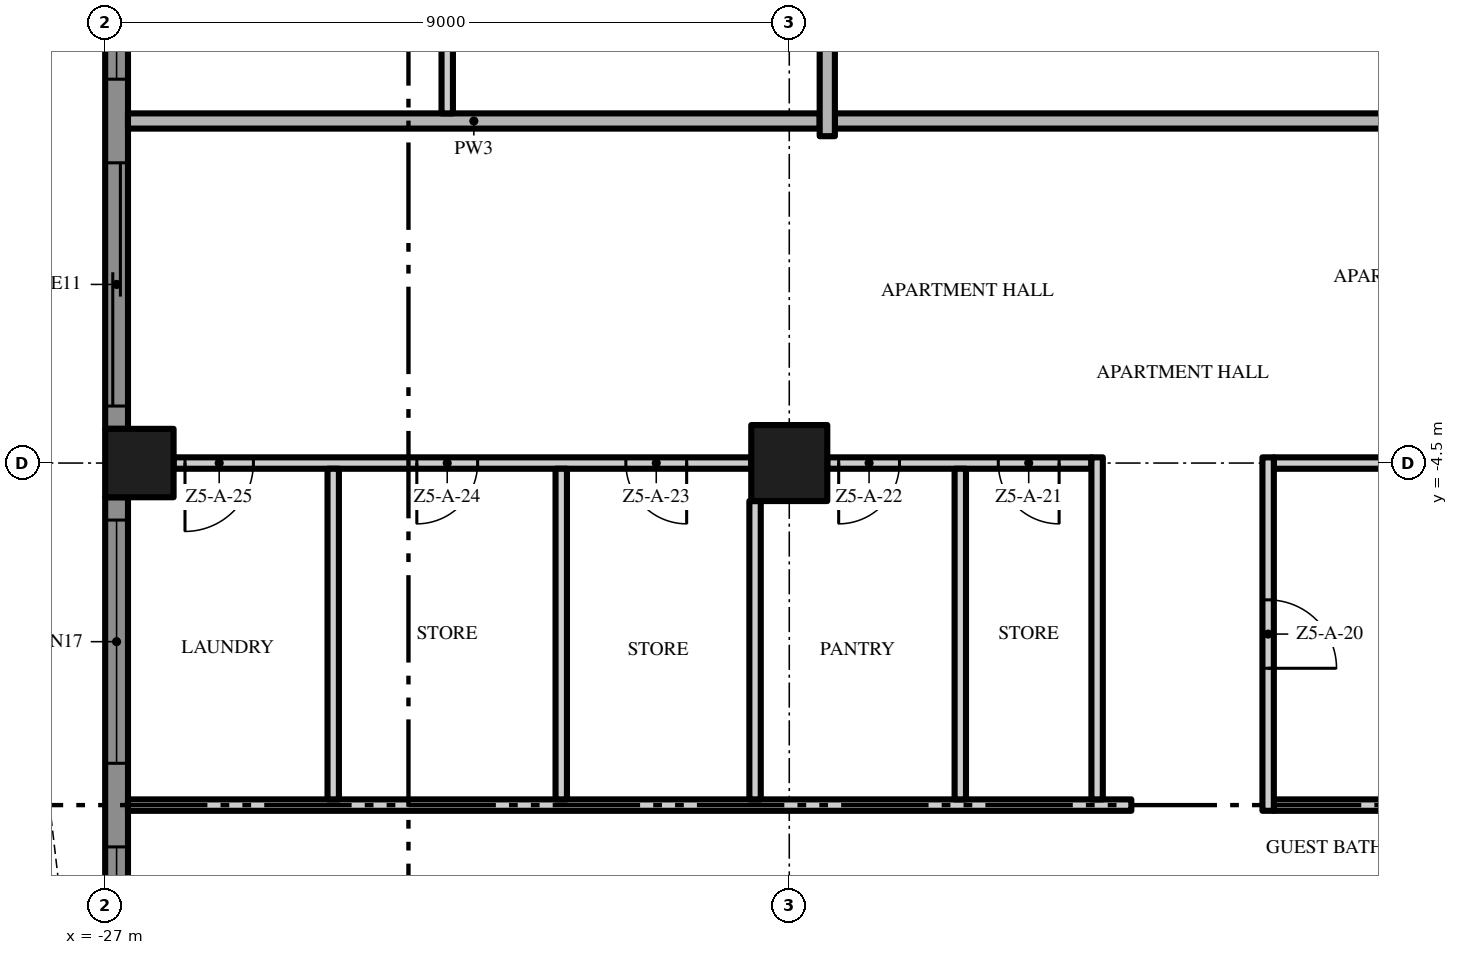
"""IFC4 building model, lengths in metres.
Left out: names, types, materials, properties, quantities, classifications, styles, units other than length and angle.
Written with IfcOpenShell. Run it as: python <this file> out.ifc"""

import sys

from ifc_helpers import new_model, si_unit, direction, frame, frame_2d, origin, origin_2d, place, context, subcontext, project, spatial, polyline, rectangle, outline, extrude, element, fill, save


model = new_model("IFC4")
c1 = context("Model", 3, precision=1e-05, world=origin(), true_north=direction((0.0, 1.0)))
c2 = subcontext(c1, "Body", "Model", "MODEL_VIEW")
j1 = project(units=[si_unit("LENGTHUNIT", "METRE"), si_unit("PLANEANGLEUNIT", "RADIAN")], contexts=[c1])
p1 = place(None, origin())
s1 = spatial("IfcSite", under=j1, at=p1, CompositionType="ELEMENT")
p2 = place(p1, origin())
s2 = spatial("IfcBuilding", under=s1, at=p2, CompositionType="ELEMENT")
p3 = place(p2, frame((0.0, 0.0, 238.8)))
s3 = spatial("IfcBuildingStorey", under=s2, at=p3, CompositionType="ELEMENT", Elevation=238.8)
p4 = place(p3, frame((-18.0, -4.5, 0.0), z_axis=(0.0, 0.0, 1.0), x_axis=(1.0, 0.0, 0.0)))
e1 = element("IfcColumn", 1, at=p4, inside=s3, PredefinedType="COLUMN", context=c2, shape_type="SweptSolid", body=[
    extrude(rectangle(XDim=1.0, YDim=1.0, at=origin_2d()), origin(), (0.0, 0.0, 1.0), 3.5),
])
p5 = place(p3, frame((-26.55, -4.5, 0.0), z_axis=(0.0, 0.0, 1.0), x_axis=(1.0, 0.0, 0.0)))
e2 = element("IfcColumn", 2, at=p5, inside=s3, PredefinedType="COLUMN", context=c2, shape_type="SweptSolid", body=[
    extrude(rectangle(XDim=0.9, YDim=0.9, at=origin_2d()), origin(), (0.0, 0.0, 1.0), 3.5),
])
p6 = place(p3, frame((-26.85, -4.05, 0.0), z_axis=(0.0, 0.0, 1.0), x_axis=(0.0, 1.0, 0.0)))
e3 = element("IfcWall", 3, at=p6, inside=s3, PredefinedType="SOLIDWALL", context=c2, shape_type="SweptSolid", body=[
    extrude(rectangle(XDim=8.1, YDim=0.3, at=frame_2d((4.05, 0.0))), origin(), (0.0, 0.0, 1.0), 3.5),
])
p7 = place(p6, frame((4.6, 0.0, 0.45)))
e4 = element("IfcOpeningElement", 4, at=p7, cuts=e3, PredefinedType="OPENING", context=c2, shape_type="SweptSolid", body=[
    extrude(rectangle(XDim=3.2, YDim=2.65, at=frame_2d((1.6, 1.325))), frame((0.0, 0.16, 0.0), z_axis=(0.0, -1.0, 0.0), x_axis=(1.0, 0.0, 0.0)), (0.0, 0.0, 1.0), 0.32),
])
p8 = place(p6, frame((0.3, 0.0, 0.0)))
e5 = element("IfcOpeningElement", 5, at=p8, cuts=e3, PredefinedType="OPENING", context=c2, shape_type="SweptSolid", body=[
    extrude(rectangle(XDim=3.2, YDim=2.4, at=frame_2d((1.6, 1.2))), frame((0.0, 0.16, 0.0), z_axis=(0.0, -1.0, 0.0), x_axis=(1.0, 0.0, 0.0)), (0.0, 0.0, 1.0), 0.32),
])
p9 = place(p3, frame((-26.85, -13.05, 0.0), z_axis=(0.0, 0.0, 1.0), x_axis=(0.0, 1.0, 0.0)))
e6 = element("IfcWall", 6, at=p9, inside=s3, PredefinedType="SOLIDWALL", context=c2, shape_type="SweptSolid", body=[
    extrude(rectangle(XDim=8.1, YDim=0.3, at=frame_2d((4.05, 0.0))), origin(), (0.0, 0.0, 1.0), 3.5),
])
p10 = place(p9, frame((4.6, 0.0, 0.45)))
e7 = element("IfcOpeningElement", 7, at=p10, cuts=e6, PredefinedType="OPENING", context=c2, shape_type="SweptSolid", body=[
    extrude(rectangle(XDim=3.2, YDim=2.65, at=frame_2d((1.6, 1.325))), frame((0.0, 0.16, 0.0), z_axis=(0.0, -1.0, 0.0), x_axis=(1.0, 0.0, 0.0)), (0.0, 0.0, 1.0), 0.32),
])
p11 = place(p9, frame((0.3, 0.0, 0.45)))
e8 = element("IfcOpeningElement", 8, at=p11, cuts=e6, PredefinedType="OPENING", context=c2, shape_type="SweptSolid", body=[
    extrude(rectangle(XDim=3.2, YDim=2.65, at=frame_2d((1.6, 1.325))), frame((0.0, 0.16, 0.0), z_axis=(0.0, -1.0, 0.0), x_axis=(1.0, 0.0, 0.0)), (0.0, 0.0, 1.0), 0.32),
])
p12 = place(p3, origin())
e9 = element("IfcWall", 9, at=p12, inside=s3, PredefinedType="USERDEFINED", context=c2, shape_type="SweptSolid", body=[
    extrude(outline(polyline([(-27.951, 18.0), (-28.612, 16.5), (-29.345, 15.0), (-29.869, 13.5), (-30.0, 12.375), (-29.985, 12.0), (-29.649, 10.5), (-28.988, 9.0), (-28.255, 7.5), (-27.731, 6.0), (-27.6, 4.875), (-27.615, 4.5), (-27.951, 3.0), (-28.612, 1.5), (-29.345, 0.0), (-29.869, -1.5), (-30.0, -2.625), (-29.985, -3.0), (-29.649, -4.5), (-28.988, -6.0), (-28.255, -7.5), (-27.731, -9.0), (-27.6, -10.125), (-27.615, -10.5), (-27.951, -12.0), (-28.612, -13.5), (-29.345, -15.0), (-29.869, -16.5), (-30.0, -17.625), (-29.985, -18.0), (-29.735, -17.99), (-29.749, -17.635), (-29.624, -16.556), (-29.114, -15.096), (-28.385, -13.605), (-27.713, -12.079), (-27.366, -10.533), (-27.349, -10.115), (-27.486, -8.944), (-28.024, -7.404), (-28.761, -5.895), (-29.41, -4.421), (-29.736, -2.967), (-29.749, -2.635), (-29.624, -1.556), (-29.114, -0.096), (-28.385, 1.395), (-27.713, 2.921), (-27.366, 4.467), (-27.349, 4.885), (-27.486, 6.056), (-28.024, 7.596), (-28.761, 9.105), (-29.41, 10.579), (-29.736, 12.033), (-29.749, 12.365), (-29.624, 13.444), (-29.114, 14.904), (-28.385, 16.395), (-27.723, 17.899), (-27.951, 18.0)])), origin(), (0.0, 0.0, 1.0), 0.9),
])
p13 = place(p3, frame((-26.7, -9.0, 0.0), z_axis=(0.0, 0.0, 1.0), x_axis=(1.0, 0.0, 0.0)))
e10 = element("IfcWall", 10, at=p13, inside=s3, PredefinedType="PARTITIONING", context=c2, shape_type="SweptSolid", body=[
    extrude(rectangle(XDim=13.2, YDim=0.15, at=frame_2d((6.6, 0.0))), origin(), (0.0, 0.0, 1.0), 3.5),
])
p14 = place(p3, frame((-11.625, -9.0, 0.0), z_axis=(0.0, 0.0, 1.0), x_axis=(1.0, 0.0, 0.0)))
e11 = element("IfcWall", 11, at=p14, inside=s3, PredefinedType="PARTITIONING", context=c2, shape_type="SweptSolid", body=[
    extrude(rectangle(XDim=11.525, YDim=0.15, at=frame_2d((5.763, 0.0))), origin(), (0.0, 0.0, 1.0), 3.5),
])
p15 = place(p14, frame((4.675, 0.0, 0.0)))
e12 = element("IfcOpeningElement", 12, at=p15, cuts=e11, PredefinedType="OPENING", context=c2, shape_type="SweptSolid", body=[
    extrude(rectangle(XDim=1.0, YDim=2.4, at=frame_2d((0.5, 1.2))), frame((0.0, 0.085, 0.0), z_axis=(0.0, -1.0, 0.0), x_axis=(1.0, 0.0, 0.0)), (0.0, 0.0, 1.0), 0.17),
])
p16 = place(p3, frame((-18.5, -4.5, 0.0), z_axis=(0.0, 0.0, 1.0), x_axis=(-1.0, 0.0, 0.0)))
e13 = element("IfcWall", 13, at=p16, inside=s3, PredefinedType="PARTITIONING", context=c2, shape_type="SweptSolid", body=[
    extrude(rectangle(XDim=7.6, YDim=0.15, at=frame_2d((3.8, 0.0))), origin(), (0.0, 0.0, 1.0), 3.5),
])
p17 = place(p16, frame((0.85, 0.0, 0.0)))
e14 = element("IfcOpeningElement", 14, at=p17, cuts=e13, PredefinedType="OPENING", context=c2, shape_type="SweptSolid", body=[
    extrude(rectangle(XDim=0.8, YDim=2.0, at=frame_2d((0.4, 1.0))), frame((0.0, 0.085, 0.0), z_axis=(0.0, -1.0, 0.0), x_axis=(1.0, 0.0, 0.0)), (0.0, 0.0, 1.0), 0.17),
])
p18 = place(p16, frame((3.6, 0.0, 0.0)))
e15 = element("IfcOpeningElement", 15, at=p18, cuts=e13, PredefinedType="OPENING", context=c2, shape_type="SweptSolid", body=[
    extrude(rectangle(XDim=0.8, YDim=2.0, at=frame_2d((0.4, 1.0))), frame((0.0, 0.085, 0.0), z_axis=(0.0, -1.0, 0.0), x_axis=(1.0, 0.0, 0.0)), (0.0, 0.0, 1.0), 0.17),
])
p19 = place(p16, frame((6.55, 0.0, 0.0)))
e16 = element("IfcOpeningElement", 16, at=p19, cuts=e13, PredefinedType="OPENING", context=c2, shape_type="SweptSolid", body=[
    extrude(rectangle(XDim=0.9, YDim=2.1, at=frame_2d((0.45, 1.05))), frame((0.0, 0.085, 0.0), z_axis=(0.0, -1.0, 0.0), x_axis=(1.0, 0.0, 0.0)), (0.0, 0.0, 1.0), 0.17),
])
p20 = place(p3, frame((-14.025, -4.5, 0.0), z_axis=(0.0, 0.0, 1.0), x_axis=(-1.0, 0.0, 0.0)))
e17 = element("IfcWall", 17, at=p20, inside=s3, PredefinedType="PARTITIONING", context=c2, shape_type="SweptSolid", body=[
    extrude(rectangle(XDim=3.475, YDim=0.15, at=frame_2d((1.738, 0.0))), origin(), (0.0, 0.0, 1.0), 3.5),
])
p21 = place(p20, frame((0.425, 0.0, 0.0)))
e18 = element("IfcOpeningElement", 18, at=p21, cuts=e17, PredefinedType="OPENING", context=c2, shape_type="SweptSolid", body=[
    extrude(rectangle(XDim=0.8, YDim=2.0, at=frame_2d((0.4, 1.0))), frame((0.0, 0.085, 0.0), z_axis=(0.0, -1.0, 0.0), x_axis=(1.0, 0.0, 0.0)), (0.0, 0.0, 1.0), 0.17),
])
p22 = place(p20, frame((2.525, 0.0, 0.0)))
e19 = element("IfcOpeningElement", 19, at=p22, cuts=e17, PredefinedType="OPENING", context=c2, shape_type="SweptSolid", body=[
    extrude(rectangle(XDim=0.8, YDim=2.0, at=frame_2d((0.4, 1.0))), frame((0.0, 0.085, 0.0), z_axis=(0.0, -1.0, 0.0), x_axis=(1.0, 0.0, 0.0)), (0.0, 0.0, 1.0), 0.17),
])
p23 = place(p3, frame((-11.625, -4.5, 0.0), z_axis=(0.0, 0.0, 1.0), x_axis=(1.0, 0.0, 0.0)))
e20 = element("IfcWall", 20, at=p23, inside=s3, PredefinedType="PARTITIONING", context=c2, shape_type="SweptSolid", body=[
    extrude(rectangle(XDim=2.125, YDim=0.15, at=frame_2d((1.062, 0.0))), origin(), (0.0, 0.0, 1.0), 3.5),
])
p24 = place(p3, frame((17.4, 0.0, 0.0), z_axis=(0.0, 0.0, 1.0), x_axis=(-1.0, 0.0, 0.0)))
e21 = element("IfcWall", 21, at=p24, inside=s3, PredefinedType="PARTITIONING", context=c2, shape_type="SweptSolid", body=[
    extrude(rectangle(XDim=34.8, YDim=0.2, at=frame_2d((17.4, 0.0))), origin(), (0.0, 0.0, 1.0), 3.5),
])
p25 = place(p24, frame((25.65, 0.0, 0.0)))
e22 = element("IfcOpeningElement", 22, at=p25, cuts=e21, PredefinedType="OPENING", context=c2, shape_type="SweptSolid", body=[
    extrude(rectangle(XDim=1.5, YDim=2.4, at=frame_2d((0.75, 1.2))), frame((0.0, 0.11, 0.0), z_axis=(0.0, -1.0, 0.0), x_axis=(1.0, 0.0, 0.0)), (0.0, 0.0, 1.0), 0.22),
])
p26 = place(p24, frame((7.65, 0.0, 0.0)))
e23 = element("IfcOpeningElement", 23, at=p26, cuts=e21, PredefinedType="OPENING", context=c2, shape_type="SweptSolid", body=[
    extrude(rectangle(XDim=1.5, YDim=2.4, at=frame_2d((0.75, 1.2))), frame((0.0, 0.11, 0.0), z_axis=(0.0, -1.0, 0.0), x_axis=(1.0, 0.0, 0.0)), (0.0, 0.0, 1.0), 0.22),
])
p27 = place(p3, frame((-26.7, 0.0, 0.0), z_axis=(0.0, 0.0, 1.0), x_axis=(1.0, 0.0, 0.0)))
e24 = element("IfcWall", 24, at=p27, inside=s3, PredefinedType="PARTITIONING", context=c2, shape_type="SweptSolid", body=[
    extrude(rectangle(XDim=9.1, YDim=0.2, at=frame_2d((4.55, 0.0))), origin(), (0.0, 0.0, 1.0), 3.5),
])
p28 = place(p3, frame((-24.0, -8.925, 0.0), z_axis=(0.0, 0.0, 1.0), x_axis=(0.0, 1.0, 0.0)))
e25 = element("IfcWall", 25, at=p28, inside=s3, PredefinedType="PARTITIONING", context=c2, shape_type="SweptSolid", body=[
    extrude(rectangle(XDim=4.35, YDim=0.15, at=frame_2d((2.175, 0.0))), origin(), (0.0, 0.0, 1.0), 3.5),
])
p29 = place(p3, frame((-22.5, 0.1, 0.0), z_axis=(0.0, 0.0, 1.0), x_axis=(0.0, 1.0, 0.0)))
e26 = element("IfcWall", 26, at=p29, inside=s3, PredefinedType="PARTITIONING", context=c2, shape_type="SweptSolid", body=[
    extrude(rectangle(XDim=17.45, YDim=0.15, at=frame_2d((8.725, 0.0))), origin(), (0.0, 0.0, 1.0), 3.5),
])
p30 = place(p29, frame((1.65, 0.0, 0.0)))
e27 = element("IfcOpeningElement", 27, at=p30, cuts=e26, PredefinedType="OPENING", context=c2, shape_type="SweptSolid", body=[
    extrude(rectangle(XDim=1.0, YDim=2.4, at=frame_2d((0.5, 1.2))), frame((0.0, 0.085, 0.0), z_axis=(0.0, -1.0, 0.0), x_axis=(1.0, 0.0, 0.0)), (0.0, 0.0, 1.0), 0.17),
])
p31 = place(p29, frame((5.0, 0.0, 0.0)))
e28 = element("IfcOpeningElement", 28, at=p31, cuts=e26, PredefinedType="OPENING", context=c2, shape_type="SweptSolid", body=[
    extrude(rectangle(XDim=1.0, YDim=2.4, at=frame_2d((0.5, 1.2))), frame((0.0, 0.085, 0.0), z_axis=(0.0, -1.0, 0.0), x_axis=(1.0, 0.0, 0.0)), (0.0, 0.0, 1.0), 0.17),
])
p32 = place(p29, frame((11.4, 0.0, 0.0)))
e29 = element("IfcOpeningElement", 29, at=p32, cuts=e26, PredefinedType="OPENING", context=c2, shape_type="SweptSolid", body=[
    extrude(rectangle(XDim=1.8, YDim=2.4, at=frame_2d((0.9, 1.2))), frame((0.0, 0.085, 0.0), z_axis=(0.0, -1.0, 0.0), x_axis=(1.0, 0.0, 0.0)), (0.0, 0.0, 1.0), 0.17),
])
p33 = place(p3, frame((-21.0, -8.925, 0.0), z_axis=(0.0, 0.0, 1.0), x_axis=(0.0, 1.0, 0.0)))
e30 = element("IfcWall", 30, at=p33, inside=s3, PredefinedType="PARTITIONING", context=c2, shape_type="SweptSolid", body=[
    extrude(rectangle(XDim=4.35, YDim=0.15, at=frame_2d((2.175, 0.0))), origin(), (0.0, 0.0, 1.0), 3.5),
])
p34 = place(p3, frame((-18.45, -8.925, 0.0), z_axis=(0.0, 0.0, 1.0), x_axis=(0.0, 1.0, 0.0)))
e31 = element("IfcWall", 31, at=p34, inside=s3, PredefinedType="PARTITIONING", context=c2, shape_type="SweptSolid", body=[
    extrude(rectangle(XDim=3.925, YDim=0.15, at=frame_2d((1.962, 0.0))), origin(), (0.0, 0.0, 1.0), 3.5),
])
p35 = place(p3, frame((-17.5, -0.2, 0.0), z_axis=(0.0, 0.0, 1.0), x_axis=(0.0, 1.0, 0.0)))
e32 = element("IfcWall", 32, at=p35, inside=s3, PredefinedType="PARTITIONING", context=c2, shape_type="SweptSolid", body=[
    extrude(rectangle(XDim=4.2, YDim=0.2, at=frame_2d((2.1, 0.0))), origin(), (0.0, 0.0, 1.0), 3.5),
])
p36 = place(p3, frame((-15.75, -8.925, 0.0), z_axis=(0.0, 0.0, 1.0), x_axis=(0.0, 1.0, 0.0)))
e33 = element("IfcWall", 33, at=p36, inside=s3, PredefinedType="PARTITIONING", context=c2, shape_type="SweptSolid", body=[
    extrude(rectangle(XDim=4.35, YDim=0.15, at=frame_2d((2.175, 0.0))), origin(), (0.0, 0.0, 1.0), 3.5),
])
p37 = place(p3, frame((-13.95, -8.925, 0.0), z_axis=(0.0, 0.0, 1.0), x_axis=(0.0, 1.0, 0.0)))
e34 = element("IfcWall", 34, at=p37, inside=s3, PredefinedType="PARTITIONING", context=c2, shape_type="SweptSolid", body=[
    extrude(rectangle(XDim=4.5, YDim=0.15, at=frame_2d((2.25, 0.0))), origin(), (0.0, 0.0, 1.0), 3.5),
])
p38 = place(p3, frame((-11.7, -4.425, 0.0), z_axis=(0.0, 0.0, 1.0), x_axis=(0.0, -1.0, 0.0)))
e35 = element("IfcWall", 35, at=p38, inside=s3, PredefinedType="PARTITIONING", context=c2, shape_type="SweptSolid", body=[
    extrude(rectangle(XDim=4.65, YDim=0.15, at=frame_2d((2.325, 0.0))), origin(), (0.0, 0.0, 1.0), 3.5),
])
p39 = place(p38, frame((1.875, 0.0, 0.0)))
e36 = element("IfcOpeningElement", 36, at=p39, cuts=e35, PredefinedType="OPENING", context=c2, shape_type="SweptSolid", body=[
    extrude(rectangle(XDim=0.9, YDim=2.1, at=frame_2d((0.45, 1.05))), frame((0.0, 0.085, 0.0), z_axis=(0.0, -1.0, 0.0), x_axis=(1.0, 0.0, 0.0)), (0.0, 0.0, 1.0), 0.17),
])
p40 = place(p7, origin())
e37 = element("IfcWindow", 37, at=p40, inside=s3, PartitioningType="SINGLE_PANEL", PredefinedType="WINDOW", context=c2, shape_type="SweptSolid", body=[
    extrude(rectangle(XDim=3.2, YDim=2.65, at=frame_2d((1.6, 1.325))), frame((0.0, 0.03, 0.0), z_axis=(0.0, -1.0, 0.0), x_axis=(1.0, 0.0, 0.0)), (0.0, 0.0, 1.0), 0.06),
])
fill(e4, e37)
p41 = place(p8, origin())
e38 = element("IfcDoor", 38, at=p41, inside=s3, OperationType="SINGLE_SWING_LEFT", PredefinedType="DOOR", context=c2, shape_type="SweptSolid", body=[
    extrude(rectangle(XDim=3.2, YDim=2.4, at=frame_2d((1.6, 1.2))), frame((0.0, 0.025, 0.0), z_axis=(0.0, -1.0, 0.0), x_axis=(1.0, 0.0, 0.0)), (0.0, 0.0, 1.0), 0.05),
])
fill(e5, e38)
p42 = place(p10, origin())
e39 = element("IfcWindow", 39, at=p42, inside=s3, PartitioningType="SINGLE_PANEL", PredefinedType="WINDOW", context=c2, shape_type="SweptSolid", body=[
    extrude(rectangle(XDim=3.2, YDim=2.65, at=frame_2d((1.6, 1.325))), frame((0.0, 0.03, 0.0), z_axis=(0.0, -1.0, 0.0), x_axis=(1.0, 0.0, 0.0)), (0.0, 0.0, 1.0), 0.06),
])
fill(e7, e39)
p43 = place(p11, origin())
e40 = element("IfcWindow", 40, at=p43, inside=s3, PartitioningType="SINGLE_PANEL", PredefinedType="WINDOW", context=c2, shape_type="SweptSolid", body=[
    extrude(rectangle(XDim=3.2, YDim=2.65, at=frame_2d((1.6, 1.325))), frame((0.0, 0.03, 0.0), z_axis=(0.0, -1.0, 0.0), x_axis=(1.0, 0.0, 0.0)), (0.0, 0.0, 1.0), 0.06),
])
fill(e8, e40)
p44 = place(p39, origin())
e41 = element("IfcDoor", 41, at=p44, inside=s3, OperationType="SINGLE_SWING_RIGHT", PredefinedType="DOOR", context=c2, shape_type="SweptSolid", body=[
    extrude(rectangle(XDim=0.9, YDim=2.1, at=frame_2d((0.45, 1.05))), frame((0.0, 0.025, 0.0), z_axis=(0.0, -1.0, 0.0), x_axis=(1.0, 0.0, 0.0)), (0.0, 0.0, 1.0), 0.05),
])
fill(e36, e41)
p45 = place(p21, origin())
e42 = element("IfcDoor", 42, at=p45, inside=s3, OperationType="SINGLE_SWING_LEFT", PredefinedType="DOOR", context=c2, shape_type="SweptSolid", body=[
    extrude(rectangle(XDim=0.8, YDim=2.0, at=frame_2d((0.4, 1.0))), frame((0.0, 0.025, 0.0), z_axis=(0.0, -1.0, 0.0), x_axis=(1.0, 0.0, 0.0)), (0.0, 0.0, 1.0), 0.05),
])
fill(e18, e42)
p46 = place(p22, origin())
e43 = element("IfcDoor", 43, at=p46, inside=s3, OperationType="SINGLE_SWING_RIGHT", PredefinedType="DOOR", context=c2, shape_type="SweptSolid", body=[
    extrude(rectangle(XDim=0.8, YDim=2.0, at=frame_2d((0.4, 1.0))), frame((0.0, 0.025, 0.0), z_axis=(0.0, -1.0, 0.0), x_axis=(1.0, 0.0, 0.0)), (0.0, 0.0, 1.0), 0.05),
])
fill(e19, e43)
p47 = place(p17, origin())
e44 = element("IfcDoor", 44, at=p47, inside=s3, OperationType="SINGLE_SWING_LEFT", PredefinedType="DOOR", context=c2, shape_type="SweptSolid", body=[
    extrude(rectangle(XDim=0.8, YDim=2.0, at=frame_2d((0.4, 1.0))), frame((0.0, 0.025, 0.0), z_axis=(0.0, -1.0, 0.0), x_axis=(1.0, 0.0, 0.0)), (0.0, 0.0, 1.0), 0.05),
])
fill(e14, e44)
p48 = place(p18, origin())
e45 = element("IfcDoor", 45, at=p48, inside=s3, OperationType="SINGLE_SWING_RIGHT", PredefinedType="DOOR", context=c2, shape_type="SweptSolid", body=[
    extrude(rectangle(XDim=0.8, YDim=2.0, at=frame_2d((0.4, 1.0))), frame((0.0, 0.025, 0.0), z_axis=(0.0, -1.0, 0.0), x_axis=(1.0, 0.0, 0.0)), (0.0, 0.0, 1.0), 0.05),
])
fill(e15, e45)
p49 = place(p19, origin())
e46 = element("IfcDoor", 46, at=p49, inside=s3, OperationType="SINGLE_SWING_RIGHT", PredefinedType="DOOR", context=c2, shape_type="SweptSolid", body=[
    extrude(rectangle(XDim=0.9, YDim=2.1, at=frame_2d((0.45, 1.05))), frame((0.0, 0.025, 0.0), z_axis=(0.0, -1.0, 0.0), x_axis=(1.0, 0.0, 0.0)), (0.0, 0.0, 1.0), 0.05),
])
fill(e16, e46)
save(model, sys.argv[1])
